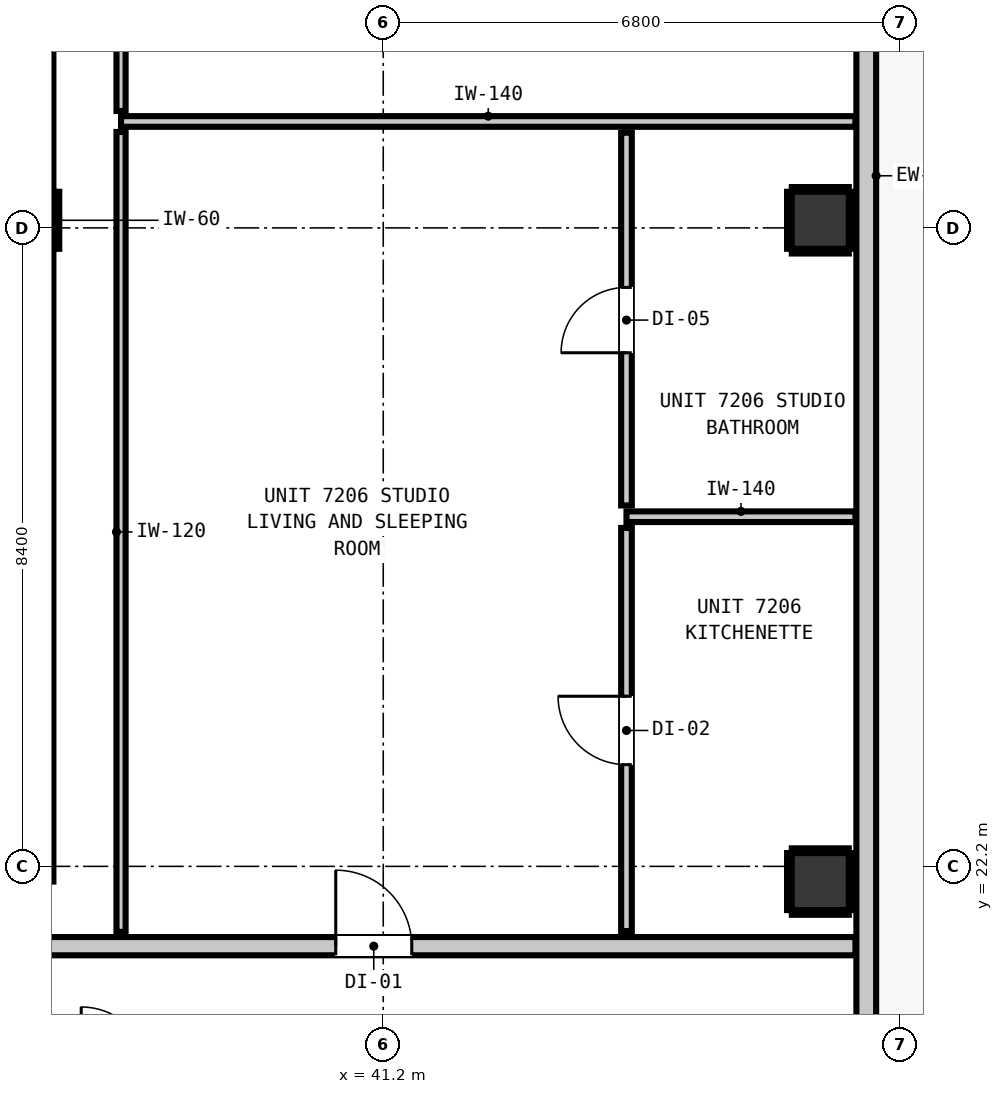
"""IFC4 building model, lengths in metres.
Left out: names, types, materials, properties, quantities, classifications, styles, units other than length and angle.
Written with IfcOpenShell. Run it as: python <this file> out.ifc"""

import sys

from ifc_helpers import new_model, si_unit, direction, frame, frame_2d, origin, origin_2d, place, context, subcontext, project, spatial, rectangle, extrude, element, fill, save


model = new_model("IFC4")
c1 = context("Model", 3, precision=1e-05, world=origin(), true_north=direction((0.0, 1.0)))
c2 = subcontext(c1, "Body", "Model", "MODEL_VIEW")
j1 = project(units=[si_unit("LENGTHUNIT", "METRE"), si_unit("PLANEANGLEUNIT", "RADIAN")], contexts=[c1])
p1 = place(None, origin())
s1 = spatial("IfcSite", under=j1, at=p1, CompositionType="ELEMENT")
p2 = place(p1, origin())
s2 = spatial("IfcBuilding", under=s1, at=p2, CompositionType="ELEMENT")
p3 = place(p2, frame((0.0, 0.0, 247.88)))
s3 = spatial("IfcBuildingStorey", under=s2, at=p3, CompositionType="ELEMENT", Elevation=247.88)
p4 = place(p3, frame((36.5, 30.7, 0.0), z_axis=(0.0, 0.0, 1.0), x_axis=(1.0, 0.0, 0.0)))
e1 = element("IfcColumn", 1, at=p4, inside=s3, PredefinedType="COLUMN", context=c2, shape_type="SweptSolid", body=[
    extrude(rectangle(XDim=0.75, YDim=0.75, at=origin_2d()), origin(), (0.0, 0.0, 1.0), 3.32),
])
p5 = place(p3, frame((36.46, 22.0, 0.0), z_axis=(0.0, 0.0, 1.0), x_axis=(0.0, 1.0, 0.0)))
e2 = element("IfcWall", 2, at=p5, inside=s3, PredefinedType="SHEAR", context=c2, shape_type="SweptSolid", body=[
    extrude(rectangle(XDim=8.32, YDim=0.8, at=frame_2d((4.16, 0.0))), origin(), (0.0, 0.0, 1.0), 3.32),
])
p6 = place(p3, frame((36.46, 31.08, 0.0), z_axis=(0.0, 0.0, 1.0), x_axis=(0.0, 1.0, 0.0)))
e3 = element("IfcWall", 3, at=p6, inside=s3, PredefinedType="SHEAR", context=c2, shape_type="SweptSolid", body=[
    extrude(rectangle(XDim=8.32, YDim=0.8, at=frame_2d((4.16, 0.0))), origin(), (0.0, 0.0, 1.0), 3.32),
])
for number, where, z_axis, x_axis in (
    (4, (46.95, 22.0, 0.0), (0.0, 0.0, 1.0), (1.0, 0.0, 0.0)),
    (5, (46.95, 30.7, 0.0), (0.0, 0.0, 1.0), (1.0, 0.0, 0.0)),
):
    element("IfcColumn", number, at=place(p3, frame(where, z_axis=z_axis, x_axis=x_axis)), inside=s3, PredefinedType="COLUMN", context=c2, shape_type="SweptSolid", body=[
        extrude(rectangle(XDim=0.75, YDim=0.75, at=origin_2d()), origin(), (0.0, 0.0, 1.0), 2.9),
    ])
p7 = place(p3, frame((47.555, 48.855, 0.0), z_axis=(0.0, 0.0, 1.0), x_axis=(0.0, -1.0, 0.0)))
e6 = element("IfcWall", 6, at=p7, inside=s3, PredefinedType="STANDARD", context=c2, shape_type="SweptSolid", body=[
    extrude(rectangle(XDim=30.31, YDim=0.26, at=frame_2d((15.155, 0.0))), origin(), (0.0, 0.0, 1.0), 2.9),
])
p8 = place(p7, frame((3.729, 0.0, 0.0)))
e7 = element("IfcOpeningElement", 7, at=p8, cuts=e6, PredefinedType="OPENING", context=c2, shape_type="SweptSolid", body=[
    extrude(rectangle(XDim=1.0, YDim=2.15, at=frame_2d((0.5, 1.075))), frame((0.0, 0.14, 0.0), z_axis=(0.0, -1.0, 0.0), x_axis=(1.0, 0.0, 0.0)), (0.0, 0.0, 1.0), 0.28),
])
p9 = place(p3, frame((10.787, 21.15, 0.0), z_axis=(0.0, 0.0, 1.0), x_axis=(1.0, 0.0, 0.0)))
e8 = element("IfcWall", 8, at=p9, inside=s3, PredefinedType="PARTITIONING", context=c2, shape_type="SweptSolid", body=[
    extrude(rectangle(XDim=36.626, YDim=0.24, at=frame_2d((18.313, 0.0))), origin(), (0.0, 0.0, 1.0), 2.9),
])
p10 = place(p9, frame((7.423, 0.0, 0.0)))
e9 = element("IfcOpeningElement", 9, at=p10, cuts=e8, PredefinedType="OPENING", context=c2, shape_type="SweptSolid", body=[
    extrude(rectangle(XDim=1.1, YDim=2.15, at=frame_2d((0.55, 1.075))), frame((0.0, 0.13, 0.0), z_axis=(0.0, -1.0, 0.0), x_axis=(1.0, 0.0, 0.0)), (0.0, 0.0, 1.0), 0.26),
])
p11 = place(p9, frame((29.788, 0.0, 0.0)))
e10 = element("IfcOpeningElement", 10, at=p11, cuts=e8, PredefinedType="OPENING", context=c2, shape_type="SweptSolid", body=[
    extrude(rectangle(XDim=1.0, YDim=2.15, at=frame_2d((0.5, 1.075))), frame((0.0, 0.13, 0.0), z_axis=(0.0, -1.0, 0.0), x_axis=(1.0, 0.0, 0.0)), (0.0, 0.0, 1.0), 0.26),
])
p12 = place(p3, frame((44.4, 26.8, 0.0), z_axis=(0.0, 0.0, 1.0), x_axis=(1.0, 0.0, 0.0)))
e11 = element("IfcWall", 11, at=p12, inside=s3, PredefinedType="PARTITIONING", context=c2, shape_type="SweptSolid", body=[
    extrude(rectangle(XDim=3.013, YDim=0.14, at=frame_2d((1.507, 0.0))), origin(), (0.0, 0.0, 1.0), 2.9),
])
p13 = place(p3, frame((37.75, 32.0, 0.0), z_axis=(0.0, 0.0, 1.0), x_axis=(1.0, 0.0, 0.0)))
e12 = element("IfcWall", 12, at=p13, inside=s3, PredefinedType="PARTITIONING", context=c2, shape_type="SweptSolid", body=[
    extrude(rectangle(XDim=9.663, YDim=0.14, at=frame_2d((4.832, 0.0))), origin(), (0.0, 0.0, 1.0), 2.9),
])
p14 = place(p3, frame((44.4, 21.348, 0.0), z_axis=(0.0, 0.0, 1.0), x_axis=(0.0, 1.0, 0.0)))
e13 = element("IfcWall", 13, at=p14, inside=s3, PredefinedType="PARTITIONING", context=c2, shape_type="SweptSolid", body=[
    extrude(rectangle(XDim=5.304, YDim=0.14, at=frame_2d((2.652, 0.0))), origin(), (0.0, 0.0, 1.0), 2.9),
])
p15 = place(p14, frame((2.19, 0.0, 0.0)))
e14 = element("IfcOpeningElement", 14, at=p15, cuts=e13, PredefinedType="OPENING", context=c2, shape_type="SweptSolid", body=[
    extrude(rectangle(XDim=0.9, YDim=2.1, at=frame_2d((0.45, 1.05))), frame((0.0, 0.08, 0.0), z_axis=(0.0, -1.0, 0.0), x_axis=(1.0, 0.0, 0.0)), (0.0, 0.0, 1.0), 0.16),
])
p16 = place(p3, frame((44.4, 26.948, 0.0), z_axis=(0.0, 0.0, 1.0), x_axis=(0.0, 1.0, 0.0)))
e15 = element("IfcWall", 15, at=p16, inside=s3, PredefinedType="PARTITIONING", context=c2, shape_type="SweptSolid", body=[
    extrude(rectangle(XDim=4.904, YDim=0.14, at=frame_2d((2.452, 0.0))), origin(), (0.0, 0.0, 1.0), 2.9),
])
p17 = place(p16, frame((2.009, 0.0, 0.0)))
e16 = element("IfcOpeningElement", 16, at=p17, cuts=e15, PredefinedType="OPENING", context=c2, shape_type="SweptSolid", body=[
    extrude(rectangle(XDim=0.86, YDim=2.02, at=frame_2d((0.43, 1.01))), frame((0.0, 0.08, 0.0), z_axis=(0.0, -1.0, 0.0), x_axis=(1.0, 0.0, 0.0)), (0.0, 0.0, 1.0), 0.16),
])
p18 = place(p3, frame((37.75, 21.338, 0.0), z_axis=(0.0, 0.0, 1.0), x_axis=(0.0, 1.0, 0.0)))
e17 = element("IfcWall", 17, at=p18, inside=s3, PredefinedType="PARTITIONING", context=c2, shape_type="SweptSolid", body=[
    extrude(rectangle(XDim=10.524, YDim=0.12, at=frame_2d((5.262, 0.0))), origin(), (0.0, 0.0, 1.0), 2.9),
])
p19 = place(p3, frame((37.75, 32.138, 0.0), z_axis=(0.0, 0.0, 1.0), x_axis=(0.0, 1.0, 0.0)))
e18 = element("IfcWall", 18, at=p19, inside=s3, PredefinedType="PARTITIONING", context=c2, shape_type="SweptSolid", body=[
    extrude(rectangle(XDim=7.954, YDim=0.12, at=frame_2d((3.977, 0.0))), origin(), (0.0, 0.0, 1.0), 2.9),
])
for number, where, z_axis, x_axis in (
    (19, (36.907, 30.325, 0.0), (0.0, 0.0, 1.0), (0.0, 1.0, 0.0)),
    (20, (46.575, 21.593, 0.0), (0.0, 0.0, 1.0), (1.0, 0.0, 0.0)),
    (21, (46.575, 22.407, 0.0), (0.0, 0.0, 1.0), (1.0, 0.0, 0.0)),
):
    element("IfcWall", number, at=place(p3, frame(where, z_axis=z_axis, x_axis=x_axis)), inside=s3, PredefinedType="PARTITIONING", context=c2, shape_type="SweptSolid", body=[
        extrude(rectangle(XDim=0.75, YDim=0.06, at=frame_2d((0.375, 0.0))), origin(), (0.0, 0.0, 1.0), 0.905),
    ])
for number, where, z_axis, x_axis in (
    (22, (46.543, 21.625, 0.0), (0.0, 0.0, 1.0), (0.0, 1.0, 0.0)),
    (23, (47.357, 21.625, 0.0), (0.0, 0.0, 1.0), (0.0, 1.0, 0.0)),
):
    element("IfcWall", number, at=place(p3, frame(where, z_axis=z_axis, x_axis=x_axis)), inside=s3, PredefinedType="PARTITIONING", context=c2, shape_type="SweptSolid", body=[
        extrude(rectangle(XDim=0.75, YDim=0.06, at=frame_2d((0.375, 0.0))), origin(), (0.0, 0.0, 1.0), 1.45),
    ])
for number, where, z_axis, x_axis in (
    (24, (46.575, 30.293, 0.0), (0.0, 0.0, 1.0), (1.0, 0.0, 0.0)),
    (25, (46.575, 31.107, 0.0), (0.0, 0.0, 1.0), (1.0, 0.0, 0.0)),
):
    element("IfcWall", number, at=place(p3, frame(where, z_axis=z_axis, x_axis=x_axis)), inside=s3, PredefinedType="PARTITIONING", context=c2, shape_type="SweptSolid", body=[
        extrude(rectangle(XDim=0.75, YDim=0.06, at=frame_2d((0.375, 0.0))), origin(), (0.0, 0.0, 1.0), 0.905),
    ])
for number, where, z_axis, x_axis in (
    (26, (46.543, 30.325, 0.0), (0.0, 0.0, 1.0), (0.0, 1.0, 0.0)),
    (27, (47.357, 30.325, 0.0), (0.0, 0.0, 1.0), (0.0, 1.0, 0.0)),
):
    element("IfcWall", number, at=place(p3, frame(where, z_axis=z_axis, x_axis=x_axis)), inside=s3, PredefinedType="PARTITIONING", context=c2, shape_type="SweptSolid", body=[
        extrude(rectangle(XDim=0.75, YDim=0.06, at=frame_2d((0.375, 0.0))), origin(), (0.0, 0.0, 1.0), 1.45),
    ])
p20 = place(p11, origin())
e28 = element("IfcDoor", 28, at=p20, inside=s3, OperationType="SINGLE_SWING_LEFT", PredefinedType="DOOR", context=c2, shape_type="SweptSolid", body=[
    extrude(rectangle(XDim=1.0, YDim=2.15, at=frame_2d((0.5, 1.075))), frame((0.0, 0.025, 0.0), z_axis=(0.0, -1.0, 0.0), x_axis=(1.0, 0.0, 0.0)), (0.0, 0.0, 1.0), 0.05),
])
fill(e10, e28)
p21 = place(p15, origin())
e29 = element("IfcDoor", 29, at=p21, inside=s3, OperationType="SINGLE_SWING_RIGHT", PredefinedType="DOOR", context=c2, shape_type="SweptSolid", body=[
    extrude(rectangle(XDim=0.9, YDim=2.1, at=frame_2d((0.45, 1.05))), frame((0.0, 0.025, 0.0), z_axis=(0.0, -1.0, 0.0), x_axis=(1.0, 0.0, 0.0)), (0.0, 0.0, 1.0), 0.05),
])
fill(e14, e29)
p22 = place(p17, origin())
e30 = element("IfcDoor", 30, at=p22, inside=s3, OperationType="SINGLE_SWING_LEFT", PredefinedType="DOOR", context=c2, shape_type="SweptSolid", body=[
    extrude(rectangle(XDim=0.86, YDim=2.02, at=frame_2d((0.43, 1.01))), frame((0.0, 0.025, 0.0), z_axis=(0.0, -1.0, 0.0), x_axis=(1.0, 0.0, 0.0)), (0.0, 0.0, 1.0), 0.05),
])
fill(e16, e30)
save(model, sys.argv[1])
